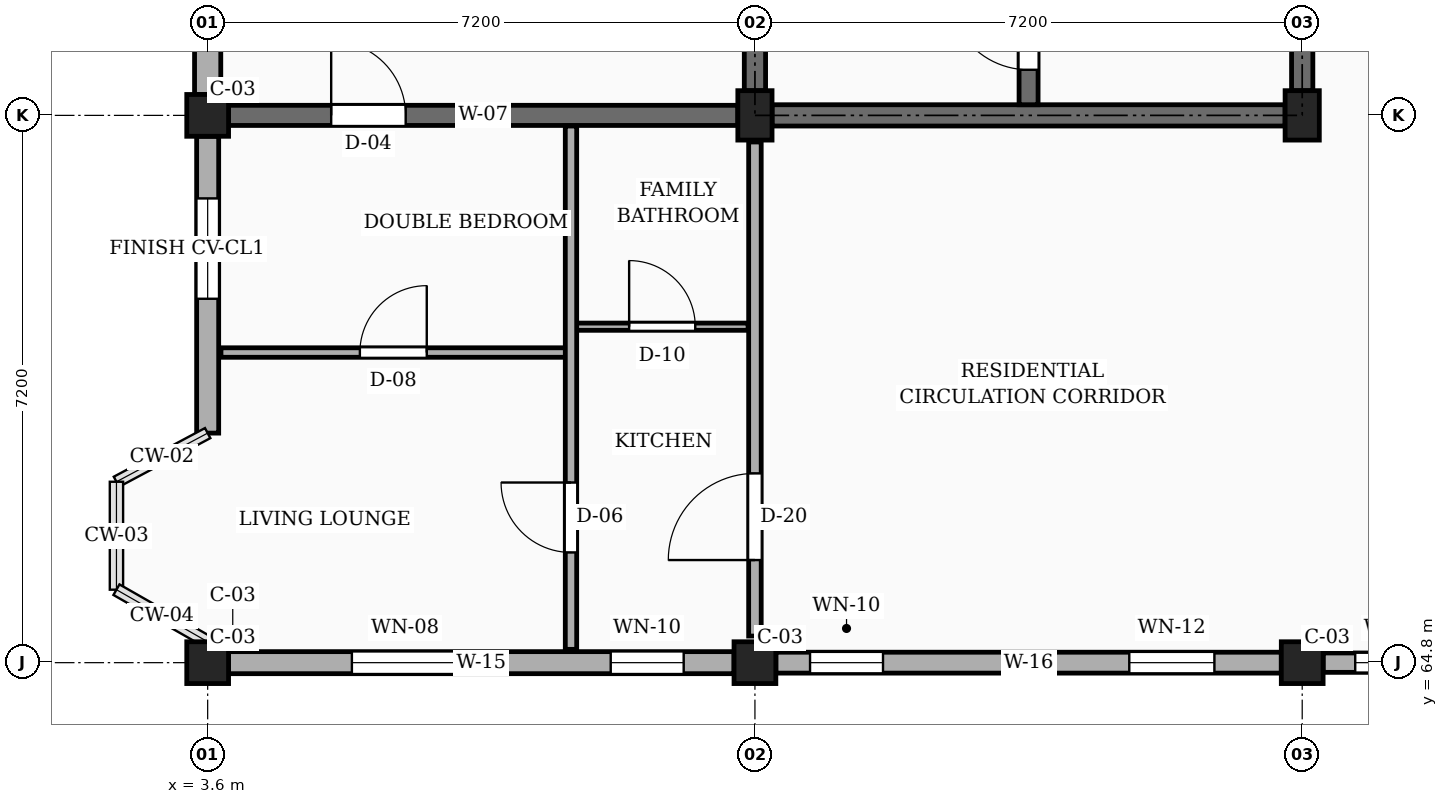
"""IFC4 building model, lengths in metres.
Left out: names, types, materials, properties, quantities, classifications, styles, units other than length and angle.
Written with IfcOpenShell. Run it as: python <this file> out.ifc"""

import sys

from ifc_helpers import new_model, si_unit, direction, frame, frame_2d, origin, origin_2d, place, context, subcontext, project, spatial, rectangle, extrude, element, fill, save


model = new_model("IFC4")
c1 = context("Model", 3, precision=1e-05, world=origin(), true_north=direction((0.0, 1.0)))
c2 = subcontext(c1, "Body", "Model", "MODEL_VIEW")
j1 = project(units=[si_unit("LENGTHUNIT", "METRE"), si_unit("PLANEANGLEUNIT", "RADIAN")], contexts=[c1])
p1 = place(None, origin())
s1 = spatial("IfcSite", under=j1, at=p1, CompositionType="ELEMENT")
p2 = place(p1, origin())
s2 = spatial("IfcBuilding", under=s1, at=p2, CompositionType="ELEMENT")
p3 = place(p2, frame((0.0, 0.0, 10.8)))
s3 = spatial("IfcBuildingStorey", under=s2, at=p3, CompositionType="ELEMENT", Elevation=10.8)
for number, where, z_axis, x_axis in (
    (1, (3.6, 64.8, 0.0), (0.0, 0.0, 1.0), (1.0, 0.0, 0.0)),
    (2, (3.6, 72.0, 0.0), (0.0, 0.0, 1.0), (1.0, 0.0, 0.0)),
    (3, (10.8, 64.8, 0.0), (0.0, 0.0, 1.0), (1.0, 0.0, 0.0)),
):
    element("IfcColumn", number, at=place(p3, frame(where, z_axis=z_axis, x_axis=x_axis)), inside=s3, PredefinedType="COLUMN", context=c2, shape_type="SweptSolid", body=[
        extrude(rectangle(XDim=0.55, YDim=0.55, at=origin_2d()), origin(), (0.0, 0.0, 1.0), 3.15),
    ])
p4 = place(p3, frame((10.8, 72.0, 0.0), z_axis=(0.0, 0.0, 1.0), x_axis=(1.0, 0.0, 0.0)))
e4 = element("IfcColumn", 4, at=p4, inside=s3, PredefinedType="COLUMN", context=c2, shape_type="SweptSolid", body=[
    extrude(rectangle(XDim=0.45, YDim=0.65, at=origin_2d()), origin(), (0.0, 0.0, 1.0), 3.15),
])
p5 = place(p3, frame((18.0, 64.8, 0.0), z_axis=(0.0, 0.0, 1.0), x_axis=(1.0, 0.0, 0.0)))
e5 = element("IfcColumn", 5, at=p5, inside=s3, PredefinedType="COLUMN", context=c2, shape_type="SweptSolid", body=[
    extrude(rectangle(XDim=0.55, YDim=0.55, at=origin_2d()), origin(), (0.0, 0.0, 1.0), 3.15),
])
p6 = place(p3, frame((18.0, 72.0, 0.0), z_axis=(0.0, 0.0, 1.0), x_axis=(1.0, 0.0, 0.0)))
e6 = element("IfcColumn", 6, at=p6, inside=s3, PredefinedType="COLUMN", context=c2, shape_type="SweptSolid", body=[
    extrude(rectangle(XDim=0.45, YDim=0.65, at=origin_2d()), origin(), (0.0, 0.0, 1.0), 3.15),
])
p7 = place(p3, frame((3.875, 72.0, 0.0), z_axis=(0.0, 0.0, 1.0), x_axis=(1.0, 0.0, 0.0)))
e7 = element("IfcWall", 7, at=p7, inside=s3, PredefinedType="SOLIDWALL", context=c2, shape_type="SweptSolid", body=[
    extrude(rectangle(XDim=6.7, YDim=0.265, at=frame_2d((3.35, 0.0))), origin(), (0.0, 0.0, 1.0), 2.21),
])
p8 = place(p7, frame((1.35, 0.0, 0.0)))
e8 = element("IfcOpeningElement", 8, at=p8, cuts=e7, PredefinedType="OPENING", context=c2, shape_type="SweptSolid", body=[
    extrude(rectangle(XDim=0.98, YDim=2.12, at=frame_2d((0.49, 1.06))), frame((0.0, 0.143, 0.0), z_axis=(0.0, -1.0, 0.0), x_axis=(1.0, 0.0, 0.0)), (0.0, 0.0, 1.0), 0.285),
])
p9 = place(p3, frame((3.875, 64.8, 0.0), z_axis=(0.0, 0.0, 1.0), x_axis=(1.0, 0.0, 0.0)))
e9 = element("IfcWall", 9, at=p9, inside=s3, PredefinedType="SOLIDWALL", context=c2, shape_type="SweptSolid", body=[
    extrude(rectangle(XDim=6.65, YDim=0.29, at=frame_2d((3.325, 0.0))), origin(), (0.0, 0.0, 1.0), 2.48),
])
p10 = place(p9, frame((1.623, 0.0, 0.78)))
e10 = element("IfcOpeningElement", 10, at=p10, cuts=e9, PredefinedType="OPENING", context=c2, shape_type="SweptSolid", body=[
    extrude(rectangle(XDim=1.4, YDim=1.15, at=frame_2d((0.7, 0.575))), frame((0.0, 0.155, 0.0), z_axis=(0.0, -1.0, 0.0), x_axis=(1.0, 0.0, 0.0)), (0.0, 0.0, 1.0), 0.31),
])
p11 = place(p9, frame((5.028, 0.0, 0.78)))
e11 = element("IfcOpeningElement", 11, at=p11, cuts=e9, PredefinedType="OPENING", context=c2, shape_type="SweptSolid", body=[
    extrude(rectangle(XDim=0.96, YDim=1.26, at=frame_2d((0.48, 0.63))), frame((0.0, 0.155, 0.0), z_axis=(0.0, -1.0, 0.0), x_axis=(1.0, 0.0, 0.0)), (0.0, 0.0, 1.0), 0.31),
])
p12 = place(p3, frame((11.075, 64.8, 0.0), z_axis=(0.0, 0.0, 1.0), x_axis=(1.0, 0.0, 0.0)))
e12 = element("IfcWall", 12, at=p12, inside=s3, PredefinedType="SOLIDWALL", context=c2, shape_type="SweptSolid", body=[
    extrude(rectangle(XDim=6.65, YDim=0.275, at=frame_2d((3.325, 0.0))), origin(), (0.0, 0.0, 1.0), 2.48),
])
p13 = place(p12, frame((0.45, 0.0, 0.78)))
e13 = element("IfcOpeningElement", 13, at=p13, cuts=e12, PredefinedType="OPENING", context=c2, shape_type="SweptSolid", body=[
    extrude(rectangle(XDim=0.96, YDim=1.26, at=frame_2d((0.48, 0.63))), frame((0.0, 0.147, 0.0), z_axis=(0.0, -1.0, 0.0), x_axis=(1.0, 0.0, 0.0)), (0.0, 0.0, 1.0), 0.295),
])
p14 = place(p12, frame((4.65, 0.0, 0.78)))
e14 = element("IfcOpeningElement", 14, at=p14, cuts=e12, PredefinedType="OPENING", context=c2, shape_type="SweptSolid", body=[
    extrude(rectangle(XDim=1.12, YDim=1.26, at=frame_2d((0.56, 0.63))), frame((0.0, 0.147, 0.0), z_axis=(0.0, -1.0, 0.0), x_axis=(1.0, 0.0, 0.0)), (0.0, 0.0, 1.0), 0.295),
])
p15 = place(p3, frame((18.275, 64.8, 0.0), z_axis=(0.0, 0.0, 1.0), x_axis=(1.0, 0.0, 0.0)))
e15 = element("IfcWall", 15, at=p15, inside=s3, PredefinedType="SOLIDWALL", context=c2, shape_type="SweptSolid", body=[
    extrude(rectangle(XDim=6.65, YDim=0.255, at=frame_2d((3.325, 0.0))), origin(), (0.0, 0.0, 1.0), 2.48),
])
p16 = place(p15, frame((0.423, 0.0, 0.78)))
e16 = element("IfcOpeningElement", 16, at=p16, cuts=e15, PredefinedType="OPENING", context=c2, shape_type="SweptSolid", body=[
    extrude(rectangle(XDim=1.12, YDim=1.26, at=frame_2d((0.56, 0.63))), frame((0.0, 0.137, 0.0), z_axis=(0.0, -1.0, 0.0), x_axis=(1.0, 0.0, 0.0)), (0.0, 0.0, 1.0), 0.275),
])
p17 = place(p15, frame((2.155, 0.0, 0.78)))
e17 = element("IfcOpeningElement", 17, at=p17, cuts=e15, PredefinedType="OPENING", context=c2, shape_type="SweptSolid", body=[
    extrude(rectangle(XDim=1.28, YDim=1.26, at=frame_2d((0.64, 0.63))), frame((0.0, 0.137, 0.0), z_axis=(0.0, -1.0, 0.0), x_axis=(1.0, 0.0, 0.0)), (0.0, 0.0, 1.0), 0.275),
])
p18 = place(p15, frame((4.417, 0.0, 0.78)))
e18 = element("IfcOpeningElement", 18, at=p18, cuts=e15, PredefinedType="OPENING", context=c2, shape_type="SweptSolid", body=[
    extrude(rectangle(XDim=1.44, YDim=1.26, at=frame_2d((0.72, 0.63))), frame((0.0, 0.137, 0.0), z_axis=(0.0, -1.0, 0.0), x_axis=(1.0, 0.0, 0.0)), (0.0, 0.0, 1.0), 0.275),
])
p19 = place(p3, frame((3.6, 78.925, 0.0), z_axis=(0.0, 0.0, 1.0), x_axis=(0.0, -1.0, 0.0)))
e19 = element("IfcWall", 19, at=p19, inside=s3, PredefinedType="SOLIDWALL", context=c2, shape_type="SweptSolid", body=[
    extrude(rectangle(XDim=6.65, YDim=0.345, at=frame_2d((3.325, 0.0))), origin(), (0.0, 0.0, 1.0), 2.48),
])
p20 = place(p19, frame((0.45, 0.0, 0.78)))
e20 = element("IfcOpeningElement", 20, at=p20, cuts=e19, PredefinedType="OPENING", context=c2, shape_type="SweptSolid", body=[
    extrude(rectangle(XDim=1.16, YDim=1.15, at=frame_2d((0.58, 0.575))), frame((0.0, 0.183, 0.0), z_axis=(0.0, -1.0, 0.0), x_axis=(1.0, 0.0, 0.0)), (0.0, 0.0, 1.0), 0.365),
])
p21 = place(p19, frame((4.65, 0.0, 0.78)))
e21 = element("IfcOpeningElement", 21, at=p21, cuts=e19, PredefinedType="OPENING", context=c2, shape_type="SweptSolid", body=[
    extrude(rectangle(XDim=1.32, YDim=1.15, at=frame_2d((0.66, 0.575))), frame((0.0, 0.183, 0.0), z_axis=(0.0, -1.0, 0.0), x_axis=(1.0, 0.0, 0.0)), (0.0, 0.0, 1.0), 0.365),
])
p22 = place(p3, frame((3.6, 71.725, 0.0), z_axis=(0.0, 0.0, 1.0), x_axis=(0.0, -1.0, 0.0)))
e22 = element("IfcWall", 22, at=p22, inside=s3, PredefinedType="SOLIDWALL", context=c2, shape_type="SweptSolid", body=[
    extrude(rectangle(XDim=3.905, YDim=0.29, at=frame_2d((1.953, 0.0))), origin(), (0.0, 0.0, 1.0), 2.48),
])
p23 = place(p22, frame((0.817, 0.0, 0.78)))
e23 = element("IfcOpeningElement", 23, at=p23, cuts=e22, PredefinedType="OPENING", context=c2, shape_type="SweptSolid", body=[
    extrude(rectangle(XDim=1.32, YDim=1.15, at=frame_2d((0.66, 0.575))), frame((0.0, 0.155, 0.0), z_axis=(0.0, -1.0, 0.0), x_axis=(1.0, 0.0, 0.0)), (0.0, 0.0, 1.0), 0.31),
])
p24 = place(p3, frame((10.8, 72.325, 0.0), z_axis=(0.0, 0.0, 1.0), x_axis=(0.0, 1.0, 0.0)))
e24 = element("IfcWall", 24, at=p24, inside=s3, PredefinedType="SHEAR", context=c2, shape_type="SweptSolid", body=[
    extrude(rectangle(XDim=6.55, YDim=0.28, at=frame_2d((3.275, 0.0))), origin(), (0.0, 0.0, 1.0), 2.91),
])
p25 = place(p3, frame((18.0, 72.325, 0.0), z_axis=(0.0, 0.0, 1.0), x_axis=(0.0, 1.0, 0.0)))
e25 = element("IfcWall", 25, at=p25, inside=s3, PredefinedType="SHEAR", context=c2, shape_type="SweptSolid", body=[
    extrude(rectangle(XDim=6.55, YDim=0.28, at=frame_2d((3.275, 0.0))), origin(), (0.0, 0.0, 1.0), 2.91),
])
p26 = place(p25, frame((1.5, 0.0, 0.0)))
e26 = element("IfcOpeningElement", 26, at=p26, cuts=e25, PredefinedType="OPENING", context=c2, shape_type="SweptSolid", body=[
    extrude(rectangle(XDim=1.1, YDim=2.15, at=frame_2d((0.55, 1.075))), frame((0.0, 0.15, 0.0), z_axis=(0.0, -1.0, 0.0), x_axis=(1.0, 0.0, 0.0)), (0.0, 0.0, 1.0), 0.3),
])
p27 = place(p3, frame((11.025, 72.0, 0.0), z_axis=(0.0, 0.0, 1.0), x_axis=(1.0, 0.0, 0.0)))
e27 = element("IfcWall", 27, at=p27, inside=s3, PredefinedType="SHEAR", context=c2, shape_type="SweptSolid", body=[
    extrude(rectangle(XDim=6.75, YDim=0.28, at=frame_2d((3.375, 0.0))), origin(), (0.0, 0.0, 1.0), 2.91),
])
p28 = place(p3, frame((14.4, 72.14, 0.0), z_axis=(0.0, 0.0, 1.0), x_axis=(0.0, 1.0, 0.0)))
e28 = element("IfcWall", 28, at=p28, inside=s3, PredefinedType="SHEAR", context=c2, shape_type="SweptSolid", body=[
    extrude(rectangle(XDim=6.92, YDim=0.25, at=frame_2d((3.46, 0.0))), origin(), (0.0, 0.0, 1.0), 2.91),
])
p29 = place(p28, frame((0.46, 0.0, 0.0)))
e29 = element("IfcOpeningElement", 29, at=p29, cuts=e28, PredefinedType="OPENING", context=c2, shape_type="SweptSolid", body=[
    extrude(rectangle(XDim=1.05, YDim=2.15, at=frame_2d((0.525, 1.075))), frame((0.0, 0.135, 0.0), z_axis=(0.0, -1.0, 0.0), x_axis=(1.0, 0.0, 0.0)), (0.0, 0.0, 1.0), 0.27),
])
p30 = place(p3, frame((10.8, 65.15, 0.0), z_axis=(0.0, 0.0, 1.0), x_axis=(0.0, 1.0, 0.0)))
e30 = element("IfcWall", 30, at=p30, inside=s3, PredefinedType="PARTITIONING", context=c2, shape_type="SweptSolid", body=[
    extrude(rectangle(XDim=6.5, YDim=0.165, at=frame_2d((3.25, 0.0))), origin(), (0.0, 0.0, 1.0), 2.26),
])
p31 = place(p30, frame((1.0, 0.0, 0.0)))
e31 = element("IfcOpeningElement", 31, at=p31, cuts=e30, PredefinedType="OPENING", context=c2, shape_type="SweptSolid", body=[
    extrude(rectangle(XDim=1.14, YDim=2.18, at=frame_2d((0.57, 1.09))), frame((0.0, 0.093, 0.0), z_axis=(0.0, -1.0, 0.0), x_axis=(1.0, 0.0, 0.0)), (0.0, 0.0, 1.0), 0.185),
])
p32 = place(p3, frame((3.775, 68.88, 0.0), z_axis=(0.0, 0.0, 1.0), x_axis=(1.0, 0.0, 0.0)))
e32 = element("IfcWall", 32, at=p32, inside=s3, PredefinedType="PARTITIONING", context=c2, shape_type="SweptSolid", body=[
    extrude(rectangle(XDim=4.535, YDim=0.125, at=frame_2d((2.268, 0.0))), origin(), (0.0, 0.0, 1.0), 2.345),
])
p33 = place(p32, frame((1.827, 0.0, 0.0)))
e33 = element("IfcOpeningElement", 33, at=p33, cuts=e32, PredefinedType="OPENING", context=c2, shape_type="SweptSolid", body=[
    extrude(rectangle(XDim=0.88, YDim=2.08, at=frame_2d((0.44, 1.04))), frame((0.0, 0.073, 0.0), z_axis=(0.0, -1.0, 0.0), x_axis=(1.0, 0.0, 0.0)), (0.0, 0.0, 1.0), 0.145),
])
p34 = place(p3, frame((8.45, 69.22, 0.0), z_axis=(0.0, 0.0, 1.0), x_axis=(1.0, 0.0, 0.0)))
e34 = element("IfcWall", 34, at=p34, inside=s3, PredefinedType="PARTITIONING", context=c2, shape_type="SweptSolid", body=[
    extrude(rectangle(XDim=2.26, YDim=0.095, at=frame_2d((1.13, 0.0))), origin(), (0.0, 0.0, 1.0), 2.345),
])
p35 = place(p34, frame((0.695, 0.0, 0.0)))
e35 = element("IfcOpeningElement", 35, at=p35, cuts=e34, PredefinedType="OPENING", context=c2, shape_type="SweptSolid", body=[
    extrude(rectangle(XDim=0.87, YDim=2.05, at=frame_2d((0.435, 1.025))), frame((0.0, 0.058, 0.0), z_axis=(0.0, -1.0, 0.0), x_axis=(1.0, 0.0, 0.0)), (0.0, 0.0, 1.0), 0.115),
])
p36 = place(p3, frame((8.38, 64.975, 0.0), z_axis=(0.0, 0.0, 1.0), x_axis=(0.0, 1.0, 0.0)))
e36 = element("IfcWall", 36, at=p36, inside=s3, PredefinedType="PARTITIONING", context=c2, shape_type="SweptSolid", body=[
    extrude(rectangle(XDim=6.885, YDim=0.15, at=frame_2d((3.442, 0.0))), origin(), (0.0, 0.0, 1.0), 2.345),
])
p37 = place(p36, frame((1.275, 0.0, 0.0)))
e37 = element("IfcOpeningElement", 37, at=p37, cuts=e36, PredefinedType="OPENING", context=c2, shape_type="SweptSolid", body=[
    extrude(rectangle(XDim=0.92, YDim=2.1, at=frame_2d((0.46, 1.05))), frame((0.0, 0.085, 0.0), z_axis=(0.0, -1.0, 0.0), x_axis=(1.0, 0.0, 0.0)), (0.0, 0.0, 1.0), 0.17),
])
p38 = place(p10, origin())
e38 = element("IfcWindow", 38, at=p38, inside=s3, PartitioningType="SINGLE_PANEL", PredefinedType="WINDOW", context=c2, shape_type="SweptSolid", body=[
    extrude(rectangle(XDim=1.4, YDim=1.15, at=frame_2d((0.7, 0.575))), frame((0.0, 0.03, 0.0), z_axis=(0.0, -1.0, 0.0), x_axis=(1.0, 0.0, 0.0)), (0.0, 0.0, 1.0), 0.06),
])
fill(e10, e38)
p39 = place(p11, origin())
e39 = element("IfcWindow", 39, at=p39, inside=s3, PartitioningType="SINGLE_PANEL", PredefinedType="WINDOW", context=c2, shape_type="SweptSolid", body=[
    extrude(rectangle(XDim=0.96, YDim=1.26, at=frame_2d((0.48, 0.63))), frame((0.0, 0.03, 0.0), z_axis=(0.0, -1.0, 0.0), x_axis=(1.0, 0.0, 0.0)), (0.0, 0.0, 1.0), 0.06),
])
fill(e11, e39)
p40 = place(p13, origin())
e40 = element("IfcWindow", 40, at=p40, inside=s3, PartitioningType="SINGLE_PANEL", PredefinedType="WINDOW", context=c2, shape_type="SweptSolid", body=[
    extrude(rectangle(XDim=0.96, YDim=1.26, at=frame_2d((0.48, 0.63))), frame((0.0, 0.03, 0.0), z_axis=(0.0, -1.0, 0.0), x_axis=(1.0, 0.0, 0.0)), (0.0, 0.0, 1.0), 0.06),
])
fill(e13, e40)
p41 = place(p14, origin())
e41 = element("IfcWindow", 41, at=p41, inside=s3, PartitioningType="SINGLE_PANEL", PredefinedType="WINDOW", context=c2, shape_type="SweptSolid", body=[
    extrude(rectangle(XDim=1.12, YDim=1.26, at=frame_2d((0.56, 0.63))), frame((0.0, 0.03, 0.0), z_axis=(0.0, -1.0, 0.0), x_axis=(1.0, 0.0, 0.0)), (0.0, 0.0, 1.0), 0.06),
])
fill(e14, e41)
p42 = place(p16, origin())
e42 = element("IfcWindow", 42, at=p42, inside=s3, PartitioningType="SINGLE_PANEL", PredefinedType="WINDOW", context=c2, shape_type="SweptSolid", body=[
    extrude(rectangle(XDim=1.12, YDim=1.26, at=frame_2d((0.56, 0.63))), frame((0.0, 0.03, 0.0), z_axis=(0.0, -1.0, 0.0), x_axis=(1.0, 0.0, 0.0)), (0.0, 0.0, 1.0), 0.06),
])
fill(e16, e42)
p43 = place(p23, origin())
e43 = element("IfcWindow", 43, at=p43, inside=s3, PartitioningType="SINGLE_PANEL", PredefinedType="WINDOW", context=c2, shape_type="SweptSolid", body=[
    extrude(rectangle(XDim=1.32, YDim=1.15, at=frame_2d((0.66, 0.575))), frame((0.0, 0.03, 0.0), z_axis=(0.0, -1.0, 0.0), x_axis=(1.0, 0.0, 0.0)), (0.0, 0.0, 1.0), 0.06),
])
fill(e23, e43)
p44 = place(p29, origin())
e44 = element("IfcDoor", 44, at=p44, inside=s3, OperationType="SINGLE_SWING_RIGHT", PredefinedType="DOOR", context=c2, shape_type="SweptSolid", body=[
    extrude(rectangle(XDim=1.05, YDim=2.15, at=frame_2d((0.525, 1.075))), frame((0.0, 0.025, 0.0), z_axis=(0.0, -1.0, 0.0), x_axis=(1.0, 0.0, 0.0)), (0.0, 0.0, 1.0), 0.05),
])
fill(e29, e44)
p45 = place(p31, origin())
e45 = element("IfcDoor", 45, at=p45, inside=s3, OperationType="SINGLE_SWING_LEFT", PredefinedType="DOOR", context=c2, shape_type="SweptSolid", body=[
    extrude(rectangle(XDim=1.14, YDim=2.18, at=frame_2d((0.57, 1.09))), frame((0.0, 0.025, 0.0), z_axis=(0.0, -1.0, 0.0), x_axis=(1.0, 0.0, 0.0)), (0.0, 0.0, 1.0), 0.05),
])
fill(e31, e45)
p46 = place(p33, origin())
e46 = element("IfcDoor", 46, at=p46, inside=s3, OperationType="SINGLE_SWING_RIGHT", PredefinedType="DOOR", context=c2, shape_type="SweptSolid", body=[
    extrude(rectangle(XDim=0.88, YDim=2.08, at=frame_2d((0.44, 1.04))), frame((0.0, 0.025, 0.0), z_axis=(0.0, -1.0, 0.0), x_axis=(1.0, 0.0, 0.0)), (0.0, 0.0, 1.0), 0.05),
])
fill(e33, e46)
p47 = place(p35, origin())
e47 = element("IfcDoor", 47, at=p47, inside=s3, OperationType="SINGLE_SWING_LEFT", PredefinedType="DOOR", context=c2, shape_type="SweptSolid", body=[
    extrude(rectangle(XDim=0.87, YDim=2.05, at=frame_2d((0.435, 1.025))), frame((0.0, 0.025, 0.0), z_axis=(0.0, -1.0, 0.0), x_axis=(1.0, 0.0, 0.0)), (0.0, 0.0, 1.0), 0.05),
])
fill(e35, e47)
p48 = place(p37, origin())
e48 = element("IfcDoor", 48, at=p48, inside=s3, OperationType="SINGLE_SWING_RIGHT", PredefinedType="DOOR", context=c2, shape_type="SweptSolid", body=[
    extrude(rectangle(XDim=0.92, YDim=2.1, at=frame_2d((0.46, 1.05))), frame((0.0, 0.025, 0.0), z_axis=(0.0, -1.0, 0.0), x_axis=(1.0, 0.0, 0.0)), (0.0, 0.0, 1.0), 0.05),
])
fill(e37, e48)
p49 = place(p8, origin())
e49 = element("IfcDoor", 49, at=p49, inside=s3, OperationType="SINGLE_SWING_LEFT", PredefinedType="DOOR", context=c2, shape_type="SweptSolid", body=[
    extrude(rectangle(XDim=0.98, YDim=2.12, at=frame_2d((0.49, 1.06))), frame((0.0, 0.025, 0.0), z_axis=(0.0, -1.0, 0.0), x_axis=(1.0, 0.0, 0.0)), (0.0, 0.0, 1.0), 0.05),
])
fill(e8, e49)
save(model, sys.argv[1])
